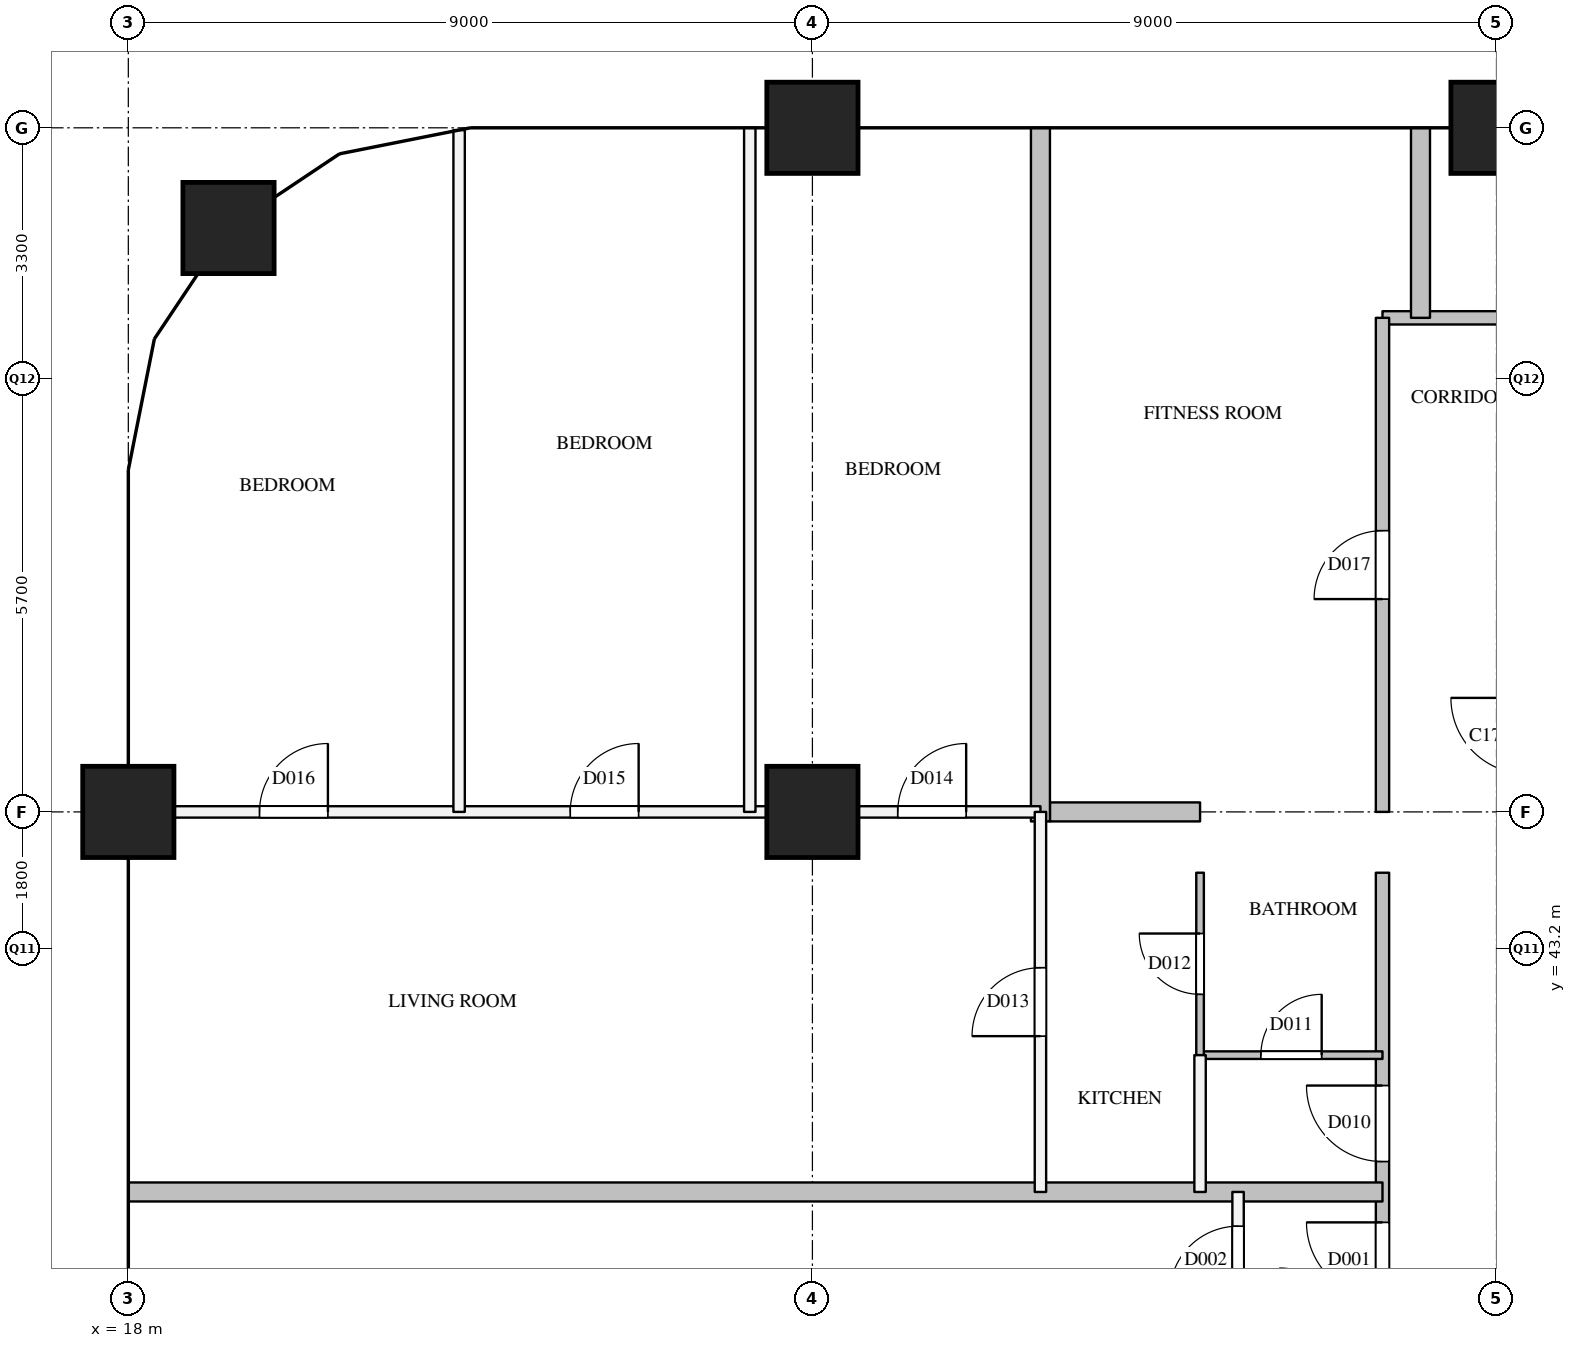
"""IFC4 building model, lengths in metres.
Left out: names, types, materials, properties, quantities, classifications, styles, units other than length and angle.
Written with IfcOpenShell. Run it as: python <this file> out.ifc"""

import sys

from ifc_helpers import new_model, si_unit, direction, frame, frame_2d, origin, origin_2d, place, context, subcontext, project, spatial, rectangle, extrude, element, fill, save


model = new_model("IFC4")
c1 = context("Model", 3, precision=1e-05, world=origin(), true_north=direction((0.0, 1.0)))
c2 = subcontext(c1, "Body", "Model", "MODEL_VIEW")
j1 = project(units=[si_unit("LENGTHUNIT", "METRE"), si_unit("PLANEANGLEUNIT", "RADIAN")], contexts=[c1])
p1 = place(None, origin())
s1 = spatial("IfcSite", under=j1, at=p1, CompositionType="ELEMENT")
p2 = place(p1, origin())
s2 = spatial("IfcBuilding", under=s1, at=p2, CompositionType="ELEMENT")
p3 = place(p2, frame((0.0, 0.0, 250.1)))
s3 = spatial("IfcBuildingStorey", under=s2, at=p3, CompositionType="ELEMENT", Elevation=250.1)
for number, where, z_axis, x_axis in (
    (1, (18.0, 45.0, 0.0), (0.0, 0.0, 1.0), (1.0, 0.0, 0.0)),
    (2, (19.318, 52.682, 0.0), (0.0, 0.0, 1.0), (1.0, 0.0, 0.0)),
    (3, (27.0, 45.0, 0.0), (0.0, 0.0, 1.0), (1.0, 0.0, 0.0)),
    (4, (27.0, 54.0, 0.0), (0.0, 0.0, 1.0), (1.0, 0.0, 0.0)),
    (5, (36.0, 54.0, 0.0), (0.0, 0.0, 1.0), (1.0, 0.0, 0.0)),
):
    element("IfcColumn", number, at=place(p3, frame(where, z_axis=z_axis, x_axis=x_axis)), inside=s3, PredefinedType="COLUMN", context=c2, shape_type="SweptSolid", body=[
        extrude(rectangle(XDim=1.2, YDim=1.2, at=origin_2d()), origin(), (0.0, 0.0, 1.0), 3.9),
    ])
p4 = place(p3, frame((34.5, 51.5, 0.0), z_axis=(0.0, 0.0, 1.0), x_axis=(1.0, 0.0, 0.0)))
e6 = element("IfcWall", 6, at=p4, inside=s3, PredefinedType="PARTITIONING", context=c2, shape_type="SweptSolid", body=[
    extrude(rectangle(XDim=15.4, YDim=0.175, at=frame_2d((7.7, 0.0))), origin(), (0.0, 0.0, 1.0), 3.6),
])
p5 = place(p4, frame((5.892, 0.0, 0.0)))
e7 = element("IfcOpeningElement", 7, at=p5, cuts=e6, PredefinedType="OPENING", context=c2, shape_type="SweptSolid", body=[
    extrude(rectangle(XDim=1.0, YDim=2.1, at=frame_2d((0.5, 1.05))), frame((0.0, 0.097, 0.0), z_axis=(0.0, -1.0, 0.0), x_axis=(1.0, 0.0, 0.0)), (0.0, 0.0, 1.0), 0.195),
])
p6 = place(p3, frame((34.5, 28.5, 0.0), z_axis=(0.0, 0.0, 1.0), x_axis=(0.0, 1.0, 0.0)))
e8 = element("IfcWall", 8, at=p6, inside=s3, PredefinedType="PARTITIONING", context=c2, shape_type="SweptSolid", body=[
    extrude(rectangle(XDim=15.7, YDim=0.175, at=frame_2d((7.85, 0.0))), origin(), (0.0, 0.0, 1.0), 3.6),
])
p7 = place(p6, frame((10.1, 0.0, 0.0)))
e9 = element("IfcOpeningElement", 9, at=p7, cuts=e8, PredefinedType="OPENING", context=c2, shape_type="SweptSolid", body=[
    extrude(rectangle(XDim=1.0, YDim=2.1, at=frame_2d((0.5, 1.05))), frame((0.0, 0.097, 0.0), z_axis=(0.0, -1.0, 0.0), x_axis=(1.0, 0.0, 0.0)), (0.0, 0.0, 1.0), 0.195),
])
p8 = place(p6, frame((11.9, 0.0, 0.0)))
e10 = element("IfcOpeningElement", 10, at=p8, cuts=e8, PredefinedType="OPENING", context=c2, shape_type="SweptSolid", body=[
    extrude(rectangle(XDim=1.0, YDim=2.1, at=frame_2d((0.5, 1.05))), frame((0.0, 0.097, 0.0), z_axis=(0.0, -1.0, 0.0), x_axis=(1.0, 0.0, 0.0)), (0.0, 0.0, 1.0), 0.195),
])
p9 = place(p3, frame((34.5, 45.0, 0.0), z_axis=(0.0, 0.0, 1.0), x_axis=(0.0, 1.0, 0.0)))
e11 = element("IfcWall", 11, at=p9, inside=s3, PredefinedType="PARTITIONING", context=c2, shape_type="SweptSolid", body=[
    extrude(rectangle(XDim=6.5, YDim=0.175, at=frame_2d((3.25, 0.0))), origin(), (0.0, 0.0, 1.0), 3.6),
])
p10 = place(p9, frame((2.8, 0.0, 0.0)))
e12 = element("IfcOpeningElement", 12, at=p10, cuts=e11, PredefinedType="OPENING", context=c2, shape_type="SweptSolid", body=[
    extrude(rectangle(XDim=0.9, YDim=2.1, at=frame_2d((0.45, 1.05))), frame((0.0, 0.097, 0.0), z_axis=(0.0, -1.0, 0.0), x_axis=(1.0, 0.0, 0.0)), (0.0, 0.0, 1.0), 0.195),
])
p11 = place(p3, frame((18.0, 45.0, 0.0), z_axis=(0.0, 0.0, 1.0), x_axis=(1.0, 0.0, 0.0)))
e13 = element("IfcWall", 13, at=p11, inside=s3, PredefinedType="PARTITIONING", context=c2, shape_type="SweptSolid", body=[
    extrude(rectangle(XDim=12.0, YDim=0.15, at=frame_2d((6.0, 0.0))), origin(), (0.0, 0.0, 1.0), 3.6),
])
p12 = place(p11, frame((10.123, 0.0, 0.0)))
e14 = element("IfcOpeningElement", 14, at=p12, cuts=e13, PredefinedType="OPENING", context=c2, shape_type="SweptSolid", body=[
    extrude(rectangle(XDim=0.9, YDim=2.1, at=frame_2d((0.45, 1.05))), frame((0.0, 0.085, 0.0), z_axis=(0.0, -1.0, 0.0), x_axis=(1.0, 0.0, 0.0)), (0.0, 0.0, 1.0), 0.17),
])
p13 = place(p11, frame((5.814, 0.0, 0.0)))
e15 = element("IfcOpeningElement", 15, at=p13, cuts=e13, PredefinedType="OPENING", context=c2, shape_type="SweptSolid", body=[
    extrude(rectangle(XDim=0.9, YDim=2.1, at=frame_2d((0.45, 1.05))), frame((0.0, 0.085, 0.0), z_axis=(0.0, -1.0, 0.0), x_axis=(1.0, 0.0, 0.0)), (0.0, 0.0, 1.0), 0.17),
])
p14 = place(p11, frame((1.726, 0.0, 0.0)))
e16 = element("IfcOpeningElement", 16, at=p14, cuts=e13, PredefinedType="OPENING", context=c2, shape_type="SweptSolid", body=[
    extrude(rectangle(XDim=0.9, YDim=2.1, at=frame_2d((0.45, 1.05))), frame((0.0, 0.085, 0.0), z_axis=(0.0, -1.0, 0.0), x_axis=(1.0, 0.0, 0.0)), (0.0, 0.0, 1.0), 0.17),
])
p15 = place(p3, frame((22.352, 45.0, 0.0), z_axis=(0.0, 0.0, 1.0), x_axis=(0.0, 1.0, 0.0)))
e17 = element("IfcWall", 17, at=p15, inside=s3, PredefinedType="PARTITIONING", context=c2, shape_type="SweptSolid", body=[
    extrude(rectangle(XDim=8.97, YDim=0.15, at=frame_2d((4.485, 0.0))), origin(), (0.0, 0.0, 1.0), 2.6),
])
p16 = place(p3, frame((26.176, 45.0, 0.0), z_axis=(0.0, 0.0, 1.0), x_axis=(0.0, 1.0, 0.0)))
e18 = element("IfcWall", 18, at=p16, inside=s3, PredefinedType="PARTITIONING", context=c2, shape_type="SweptSolid", body=[
    extrude(rectangle(XDim=9.0, YDim=0.15, at=frame_2d((4.5, 0.0))), origin(), (0.0, 0.0, 1.0), 2.6),
])
p17 = place(p3, frame((30.0, 40.0, 0.0), z_axis=(0.0, 0.0, 1.0), x_axis=(0.0, 1.0, 0.0)))
e19 = element("IfcWall", 19, at=p17, inside=s3, PredefinedType="PARTITIONING", context=c2, shape_type="SweptSolid", body=[
    extrude(rectangle(XDim=5.0, YDim=0.15, at=frame_2d((2.5, 0.0))), origin(), (0.0, 0.0, 1.0), 3.6),
])
p18 = place(p17, frame((2.05, 0.0, 0.0)))
e20 = element("IfcOpeningElement", 20, at=p18, cuts=e19, PredefinedType="OPENING", context=c2, shape_type="SweptSolid", body=[
    extrude(rectangle(XDim=0.9, YDim=2.1, at=frame_2d((0.45, 1.05))), frame((0.0, 0.085, 0.0), z_axis=(0.0, -1.0, 0.0), x_axis=(1.0, 0.0, 0.0)), (0.0, 0.0, 1.0), 0.17),
])
p19 = place(p3, frame((32.1, 40.0, 0.0), z_axis=(0.0, 0.0, 1.0), x_axis=(0.0, 1.0, 0.0)))
e21 = element("IfcWall", 21, at=p19, inside=s3, PredefinedType="PARTITIONING", context=c2, shape_type="SweptSolid", body=[
    extrude(rectangle(XDim=1.8, YDim=0.15, at=frame_2d((0.9, 0.0))), origin(), (0.0, 0.0, 1.0), 3.6),
])
p20 = place(p3, frame((32.6, 38.2, 0.0), z_axis=(0.0, 0.0, 1.0), x_axis=(0.0, 1.0, 0.0)))
e22 = element("IfcWall", 22, at=p20, inside=s3, PredefinedType="PARTITIONING", context=c2, shape_type="SweptSolid", body=[
    extrude(rectangle(XDim=1.8, YDim=0.15, at=frame_2d((0.9, 0.0))), origin(), (0.0, 0.0, 1.0), 3.6),
])
p21 = place(p20, frame((0.45, 0.0, 0.0)))
e23 = element("IfcOpeningElement", 23, at=p21, cuts=e22, PredefinedType="OPENING", context=c2, shape_type="SweptSolid", body=[
    extrude(rectangle(XDim=0.9, YDim=2.1, at=frame_2d((0.45, 1.05))), frame((0.0, 0.085, 0.0), z_axis=(0.0, -1.0, 0.0), x_axis=(1.0, 0.0, 0.0)), (0.0, 0.0, 1.0), 0.17),
])
p22 = place(p3, frame((18.0, 40.0, 0.0), z_axis=(0.0, 0.0, 1.0), x_axis=(1.0, 0.0, 0.0)))
e24 = element("IfcWall", 24, at=p22, inside=s3, PredefinedType="PARTITIONING", context=c2, shape_type="SweptSolid", body=[
    extrude(rectangle(XDim=16.5, YDim=0.25, at=frame_2d((8.25, 0.0))), origin(), (0.0, 0.0, 1.0), 2.6),
])
p23 = place(p3, frame((30.125, 45.0, 0.0), z_axis=(0.0, 0.0, 1.0), x_axis=(1.0, 0.0, 0.0)))
e25 = element("IfcWall", 25, at=p23, inside=s3, PredefinedType="PARTITIONING", context=c2, shape_type="SweptSolid", body=[
    extrude(rectangle(XDim=1.975, YDim=0.25, at=frame_2d((0.988, 0.0))), origin(), (0.0, 0.0, 1.0), 3.6),
])
p24 = place(p3, frame((30.0, 44.875, 0.0), z_axis=(0.0, 0.0, 1.0), x_axis=(0.0, 1.0, 0.0)))
e26 = element("IfcWall", 26, at=p24, inside=s3, PredefinedType="PARTITIONING", context=c2, shape_type="SweptSolid", body=[
    extrude(rectangle(XDim=9.125, YDim=0.25, at=frame_2d((4.562, 0.0))), origin(), (0.0, 0.0, 1.0), 2.6),
])
p25 = place(p3, frame((35.0, 51.5, 0.0), z_axis=(0.0, 0.0, 1.0), x_axis=(0.0, 1.0, 0.0)))
e27 = element("IfcWall", 27, at=p25, inside=s3, PredefinedType="PARTITIONING", context=c2, shape_type="SweptSolid", body=[
    extrude(rectangle(XDim=2.5, YDim=0.25, at=frame_2d((1.25, 0.0))), origin(), (0.0, 0.0, 1.0), 2.6),
])
p26 = place(p3, frame((32.1, 41.8, 0.0), z_axis=(0.0, 0.0, 1.0), x_axis=(1.0, 0.0, 0.0)))
e28 = element("IfcWall", 28, at=p26, inside=s3, PredefinedType="PARTITIONING", context=c2, shape_type="SweptSolid", body=[
    extrude(rectangle(XDim=2.4, YDim=0.1, at=frame_2d((1.2, 0.0))), origin(), (0.0, 0.0, 1.0), 3.6),
])
p27 = place(p26, frame((0.8, 0.0, 0.0)))
e29 = element("IfcOpeningElement", 29, at=p27, cuts=e28, PredefinedType="OPENING", context=c2, shape_type="SweptSolid", body=[
    extrude(rectangle(XDim=0.8, YDim=2.1, at=frame_2d((0.4, 1.05))), frame((0.0, 0.06, 0.0), z_axis=(0.0, -1.0, 0.0), x_axis=(1.0, 0.0, 0.0)), (0.0, 0.0, 1.0), 0.12),
])
p28 = place(p3, frame((32.1, 41.8, 0.0), z_axis=(0.0, 0.0, 1.0), x_axis=(0.0, 1.0, 0.0)))
e30 = element("IfcWall", 30, at=p28, inside=s3, PredefinedType="PARTITIONING", context=c2, shape_type="SweptSolid", body=[
    extrude(rectangle(XDim=2.4, YDim=0.1, at=frame_2d((1.2, 0.0))), origin(), (0.0, 0.0, 1.0), 3.6),
])
p29 = place(p28, frame((0.8, 0.0, 0.0)))
e31 = element("IfcOpeningElement", 31, at=p29, cuts=e30, PredefinedType="OPENING", context=c2, shape_type="SweptSolid", body=[
    extrude(rectangle(XDim=0.8, YDim=2.1, at=frame_2d((0.4, 1.05))), frame((0.0, 0.06, 0.0), z_axis=(0.0, -1.0, 0.0), x_axis=(1.0, 0.0, 0.0)), (0.0, 0.0, 1.0), 0.12),
])
p30 = place(p7, origin())
e32 = element("IfcDoor", 32, at=p30, inside=s3, OperationType="SINGLE_SWING_RIGHT", PredefinedType="DOOR", context=c2, shape_type="SweptSolid", body=[
    extrude(rectangle(XDim=1.0, YDim=2.1, at=frame_2d((0.5, 1.05))), frame((0.0, 0.025, 0.0), z_axis=(0.0, -1.0, 0.0), x_axis=(1.0, 0.0, 0.0)), (0.0, 0.0, 1.0), 0.05),
])
fill(e9, e32)
p31 = place(p21, origin())
e33 = element("IfcDoor", 33, at=p31, inside=s3, OperationType="SINGLE_SWING_LEFT", PredefinedType="DOOR", context=c2, shape_type="SweptSolid", body=[
    extrude(rectangle(XDim=0.9, YDim=2.1, at=frame_2d((0.45, 1.05))), frame((0.0, 0.025, 0.0), z_axis=(0.0, -1.0, 0.0), x_axis=(1.0, 0.0, 0.0)), (0.0, 0.0, 1.0), 0.05),
])
fill(e23, e33)
p32 = place(p8, origin())
e34 = element("IfcDoor", 34, at=p32, inside=s3, OperationType="SINGLE_SWING_RIGHT", PredefinedType="DOOR", context=c2, shape_type="SweptSolid", body=[
    extrude(rectangle(XDim=1.0, YDim=2.1, at=frame_2d((0.5, 1.05))), frame((0.0, 0.025, 0.0), z_axis=(0.0, -1.0, 0.0), x_axis=(1.0, 0.0, 0.0)), (0.0, 0.0, 1.0), 0.05),
])
fill(e10, e34)
p33 = place(p27, origin())
e35 = element("IfcDoor", 35, at=p33, inside=s3, OperationType="SINGLE_SWING_RIGHT", PredefinedType="DOOR", context=c2, shape_type="SweptSolid", body=[
    extrude(rectangle(XDim=0.8, YDim=2.1, at=frame_2d((0.4, 1.05))), frame((0.0, 0.025, 0.0), z_axis=(0.0, -1.0, 0.0), x_axis=(1.0, 0.0, 0.0)), (0.0, 0.0, 1.0), 0.05),
])
fill(e29, e35)
p34 = place(p29, origin())
e36 = element("IfcDoor", 36, at=p34, inside=s3, OperationType="SINGLE_SWING_RIGHT", PredefinedType="DOOR", context=c2, shape_type="SweptSolid", body=[
    extrude(rectangle(XDim=0.8, YDim=2.1, at=frame_2d((0.4, 1.05))), frame((0.0, 0.025, 0.0), z_axis=(0.0, -1.0, 0.0), x_axis=(1.0, 0.0, 0.0)), (0.0, 0.0, 1.0), 0.05),
])
fill(e31, e36)
p35 = place(p18, origin())
e37 = element("IfcDoor", 37, at=p35, inside=s3, OperationType="SINGLE_SWING_LEFT", PredefinedType="DOOR", context=c2, shape_type="SweptSolid", body=[
    extrude(rectangle(XDim=0.9, YDim=2.1, at=frame_2d((0.45, 1.05))), frame((0.0, 0.025, 0.0), z_axis=(0.0, -1.0, 0.0), x_axis=(1.0, 0.0, 0.0)), (0.0, 0.0, 1.0), 0.05),
])
fill(e20, e37)
p36 = place(p12, origin())
e38 = element("IfcDoor", 38, at=p36, inside=s3, OperationType="SINGLE_SWING_RIGHT", PredefinedType="DOOR", context=c2, shape_type="SweptSolid", body=[
    extrude(rectangle(XDim=0.9, YDim=2.1, at=frame_2d((0.45, 1.05))), frame((0.0, 0.025, 0.0), z_axis=(0.0, -1.0, 0.0), x_axis=(1.0, 0.0, 0.0)), (0.0, 0.0, 1.0), 0.05),
])
fill(e14, e38)
p37 = place(p13, origin())
e39 = element("IfcDoor", 39, at=p37, inside=s3, OperationType="SINGLE_SWING_RIGHT", PredefinedType="DOOR", context=c2, shape_type="SweptSolid", body=[
    extrude(rectangle(XDim=0.9, YDim=2.1, at=frame_2d((0.45, 1.05))), frame((0.0, 0.025, 0.0), z_axis=(0.0, -1.0, 0.0), x_axis=(1.0, 0.0, 0.0)), (0.0, 0.0, 1.0), 0.05),
])
fill(e15, e39)
p38 = place(p14, origin())
e40 = element("IfcDoor", 40, at=p38, inside=s3, OperationType="SINGLE_SWING_RIGHT", PredefinedType="DOOR", context=c2, shape_type="SweptSolid", body=[
    extrude(rectangle(XDim=0.9, YDim=2.1, at=frame_2d((0.45, 1.05))), frame((0.0, 0.025, 0.0), z_axis=(0.0, -1.0, 0.0), x_axis=(1.0, 0.0, 0.0)), (0.0, 0.0, 1.0), 0.05),
])
fill(e16, e40)
p39 = place(p10, origin())
e41 = element("IfcDoor", 41, at=p39, inside=s3, OperationType="SINGLE_SWING_LEFT", PredefinedType="DOOR", context=c2, shape_type="SweptSolid", body=[
    extrude(rectangle(XDim=0.9, YDim=2.1, at=frame_2d((0.45, 1.05))), frame((0.0, 0.025, 0.0), z_axis=(0.0, -1.0, 0.0), x_axis=(1.0, 0.0, 0.0)), (0.0, 0.0, 1.0), 0.05),
])
fill(e12, e41)
save(model, sys.argv[1])
